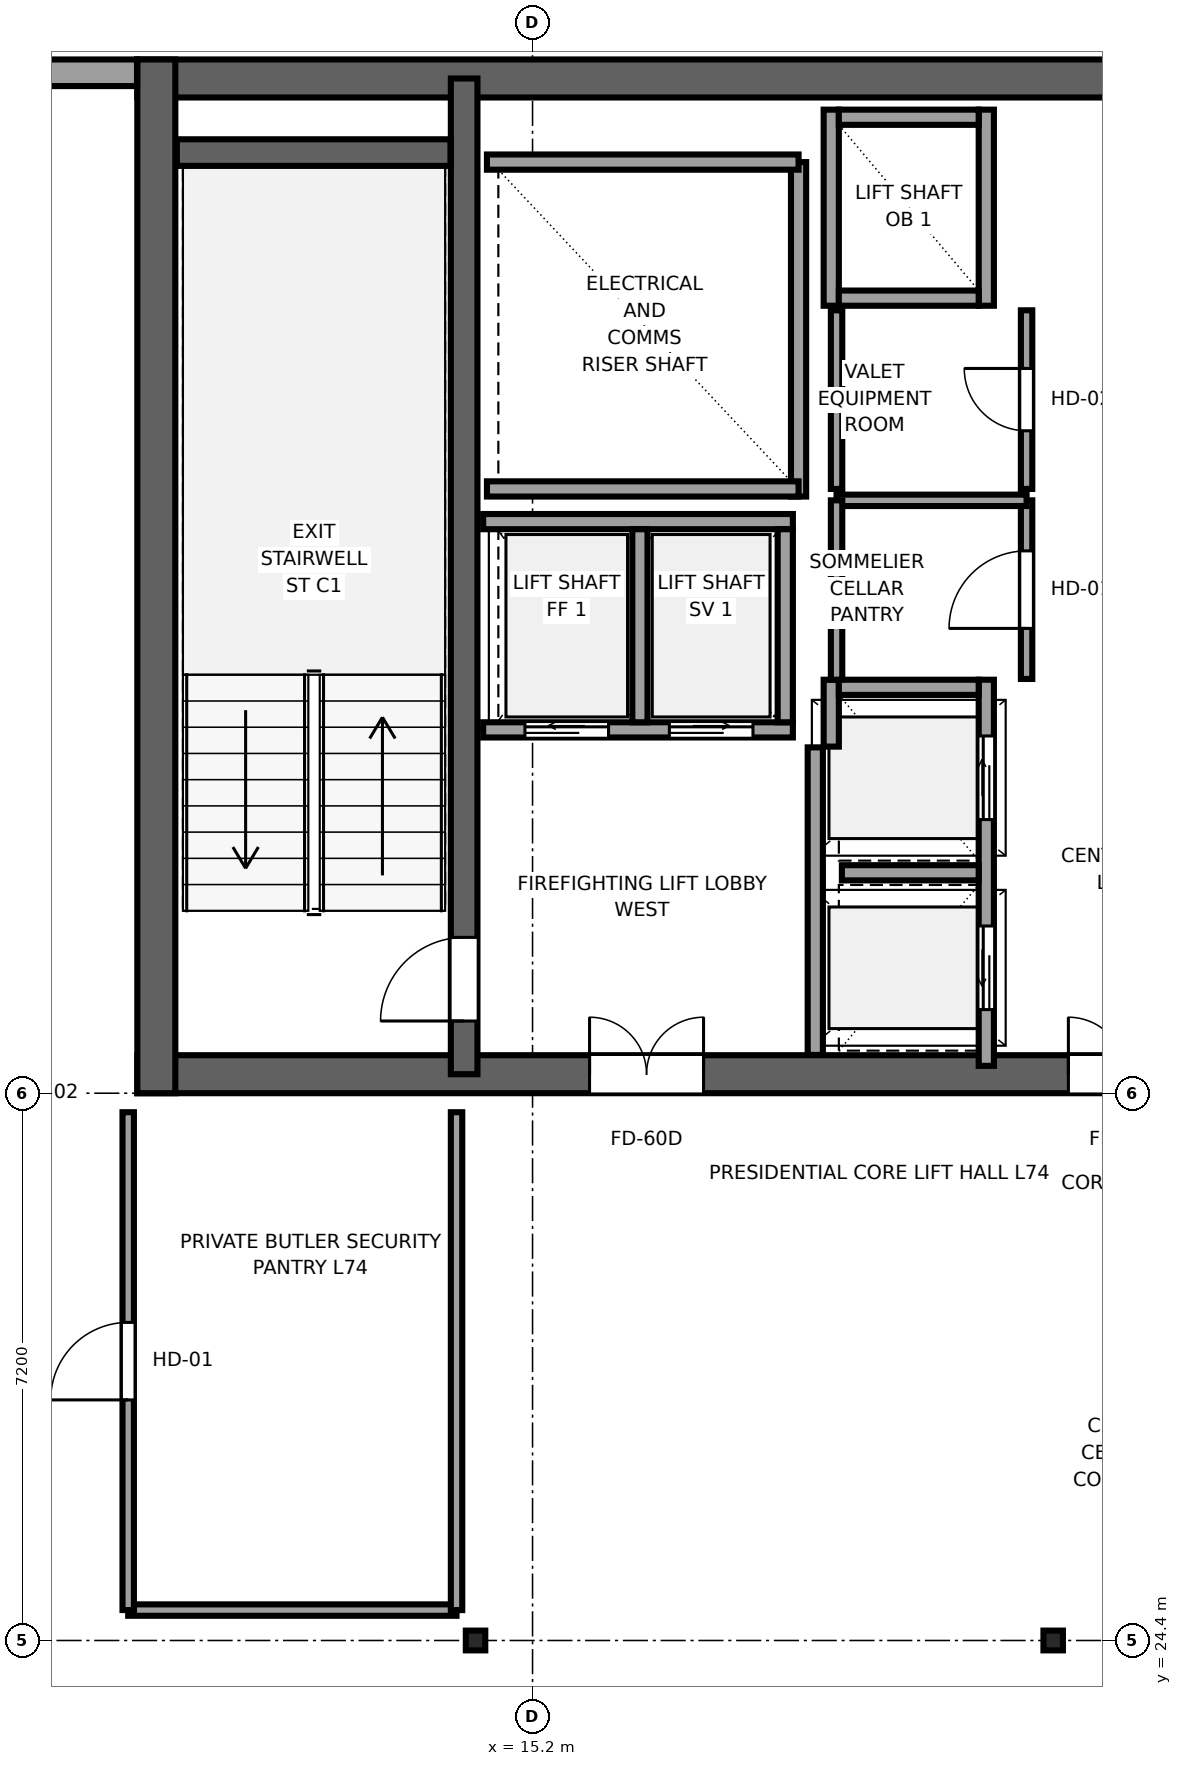
"""IFC4 building model, lengths in metres.
Left out: names, types, materials, properties, quantities, classifications, styles, units other than length and angle.
Written with IfcOpenShell. Run it as: python <this file> out.ifc"""

import sys

from ifc_helpers import new_model, si_unit, direction, frame, frame_2d, origin, origin_2d, place, context, subcontext, project, spatial, rectangle, i_section, extrude, source, transform, mapped, element, fill, save


model = new_model("IFC4")
c1 = context("Model", 3, precision=1e-05, world=origin(), true_north=direction((0.0, 1.0)))
c2 = subcontext(c1, "Body", "Model", "MODEL_VIEW")
j1 = project(units=[si_unit("LENGTHUNIT", "METRE"), si_unit("PLANEANGLEUNIT", "RADIAN")], contexts=[c1])
p1 = place(None, origin())
s1 = spatial("IfcSite", under=j1, at=p1, CompositionType="ELEMENT")
p2 = place(p1, origin())
s2 = spatial("IfcBuilding", under=s1, at=p2, CompositionType="ELEMENT")
p3 = place(p2, frame((0.0, 0.0, 278.6)))
s3 = spatial("IfcBuildingStorey", under=s2, at=p3, CompositionType="ELEMENT", Elevation=278.6)
p4 = place(p3, frame((10.0, 31.85, 0.0), z_axis=(0.0, 0.0, 1.0), x_axis=(1.0, 0.0, 0.0)))
e1 = element("IfcWall", 1, at=p4, inside=s3, PredefinedType="SHEAR", context=c2, shape_type="SweptSolid", body=[
    extrude(rectangle(XDim=26.0, YDim=0.5, at=frame_2d((13.0, 0.0))), origin(), (0.0, 0.0, 1.0), 3.55),
])
p5 = place(p4, frame((7.45, 0.0, 0.0), z_axis=(0.0, 0.0, 1.0), x_axis=(-1.0, 0.0, 0.0)))
e2 = element("IfcOpeningElement", 2, at=p5, cuts=e1, PredefinedType="OPENING", context=c2, shape_type="SweptSolid", body=[
    extrude(rectangle(XDim=1.5, YDim=2.04, at=frame_2d((0.75, 1.02))), frame((0.0, 0.26, 0.0), z_axis=(0.0, -1.0, 0.0), x_axis=(1.0, 0.0, 0.0)), (0.0, 0.0, 1.0), 0.52),
])
p6 = place(p4, frame((13.75, 0.0, 0.0), z_axis=(0.0, 0.0, 1.0), x_axis=(-1.0, 0.0, 0.0)))
e3 = element("IfcOpeningElement", 3, at=p6, cuts=e1, PredefinedType="OPENING", context=c2, shape_type="SweptSolid", body=[
    extrude(rectangle(XDim=1.5, YDim=2.04, at=frame_2d((0.75, 1.02))), frame((0.0, 0.26, 0.0), z_axis=(0.0, -1.0, 0.0), x_axis=(1.0, 0.0, 0.0)), (0.0, 0.0, 1.0), 0.52),
])
p7 = place(p4, frame((20.05, 0.0, 0.0), z_axis=(0.0, 0.0, 1.0), x_axis=(-1.0, 0.0, 0.0)))
e4 = element("IfcOpeningElement", 4, at=p7, cuts=e1, PredefinedType="OPENING", context=c2, shape_type="SweptSolid", body=[
    extrude(rectangle(XDim=1.5, YDim=2.04, at=frame_2d((0.75, 1.02))), frame((0.0, 0.26, 0.0), z_axis=(0.0, -1.0, 0.0), x_axis=(1.0, 0.0, 0.0)), (0.0, 0.0, 1.0), 0.52),
])
p8 = place(p3, frame((10.0, 44.95, 0.0), z_axis=(0.0, 0.0, 1.0), x_axis=(1.0, 0.0, 0.0)))
e5 = element("IfcWall", 5, at=p8, inside=s3, PredefinedType="SHEAR", context=c2, shape_type="SweptSolid", body=[
    extrude(rectangle(XDim=26.0, YDim=0.5, at=frame_2d((13.0, 0.0))), origin(), (0.0, 0.0, 1.0), 3.55),
])
p9 = place(p3, frame((10.25, 31.6, 0.0), z_axis=(0.0, 0.0, 1.0), x_axis=(0.0, 1.0, 0.0)))
e6 = element("IfcWall", 6, at=p9, inside=s3, PredefinedType="SHEAR", context=c2, shape_type="SweptSolid", body=[
    extrude(rectangle(XDim=13.6, YDim=0.5, at=frame_2d((6.8, 0.0))), origin(), (0.0, 0.0, 1.0), 3.55),
])
p10 = place(p3, frame((14.3, 31.85, 0.0), z_axis=(0.0, 0.0, 1.0), x_axis=(0.0, 1.0, 0.0)))
e7 = element("IfcWall", 7, at=p10, inside=s3, PredefinedType="SHEAR", context=c2, shape_type="SweptSolid", body=[
    extrude(rectangle(XDim=13.1, YDim=0.35, at=frame_2d((6.55, 0.0))), origin(), (0.0, 0.0, 1.0), 3.55),
])
p11 = place(p10, frame((0.7, 0.0, 0.0)))
e8 = element("IfcOpeningElement", 8, at=p11, cuts=e7, PredefinedType="OPENING", context=c2, shape_type="SweptSolid", body=[
    extrude(rectangle(XDim=1.1, YDim=2.12, at=frame_2d((0.55, 1.06))), frame((0.0, 0.185, 0.0), z_axis=(0.0, -1.0, 0.0), x_axis=(1.0, 0.0, 0.0)), (0.0, 0.0, 1.0), 0.37),
])
p12 = place(p3, frame((10.52, 43.975, 0.0), z_axis=(0.0, 0.0, 1.0), x_axis=(1.0, 0.0, 0.0)))
e9 = element("IfcWall", 9, at=p12, inside=s3, PredefinedType="SHEAR", context=c2, shape_type="SweptSolid", body=[
    extrude(rectangle(XDim=3.6, YDim=0.35, at=frame_2d((1.8, 0.0))), origin(), (0.0, 0.0, 1.0), 3.55),
])
m1 = source(origin(), c2, "Body", "SweptSolid", [
    extrude(i_section(OverallWidth=0.256, OverallDepth=0.26, WebThickness=0.01, FlangeThickness=0.017, FilletRadius=0.014, at=origin_2d()), origin(), (0.0, 0.0, 1.0), 3.55),
])
for number, where, z_axis, x_axis in (
    (10, (14.45, 24.4, 0.0), (0.0, 0.0, 1.0), (1.0, 0.0, 0.0)),
    (11, (22.05, 24.4, 0.0), (0.0, 0.0, 1.0), (1.0, 0.0, 0.0)),
):
    element("IfcColumn", number, at=place(p3, frame(where, z_axis=z_axis, x_axis=x_axis)), inside=s3, PredefinedType="COLUMN", context=c2, shape_type="MappedRepresentation", body=[
        mapped(m1, transform((0.0, 0.0, 0.0), x_axis=(1.0, 0.0, 0.0), y_axis=(0.0, 1.0, 0.0), z_axis=(0.0, 0.0, 1.0), scale=1.0)),
    ])
p13 = place(p3, frame((9.996, 45.025, 0.0), z_axis=(0.0, 0.0, 1.0), x_axis=(-1.0, 0.0, 0.0)))
e12 = element("IfcWall", 12, at=p13, inside=s3, PredefinedType="SOLIDWALL", context=c2, shape_type="SweptSolid", body=[
    extrude(rectangle(XDim=2.979, YDim=0.35, at=frame_2d((1.49, 0.0))), origin(), (0.0, 0.0, 1.0), 2.12),
])
p14 = place(p3, frame((18.7, 39.45, 0.0), z_axis=(0.0, 0.0, 1.0), x_axis=(0.0, 1.0, 0.0)))
e13 = element("IfcWall", 13, at=p14, inside=s3, PredefinedType="SOLIDWALL", context=c2, shape_type="SweptSolid", body=[
    extrude(rectangle(XDim=4.4, YDim=0.2, at=frame_2d((2.2, 0.0))), origin(), (0.0, 0.0, 1.0), 3.33),
])
for number, where, z_axis, x_axis in (
    (14, (14.6, 39.55, 0.0), (0.0, 0.0, 1.0), (1.0, 0.0, 0.0)),
    (15, (14.6, 43.85, 0.0), (0.0, 0.0, 1.0), (1.0, 0.0, 0.0)),
):
    element("IfcWall", number, at=place(p3, frame(where, z_axis=z_axis, x_axis=x_axis)), inside=s3, PredefinedType="SOLIDWALL", context=c2, shape_type="SweptSolid", body=[
        extrude(rectangle(XDim=4.1, YDim=0.2, at=frame_2d((2.05, 0.0))), origin(), (0.0, 0.0, 1.0), 3.33),
    ])
p15 = place(p3, frame((18.92, 32.104, 0.0), z_axis=(0.0, 0.0, 1.0), x_axis=(0.0, 1.0, 0.0)))
e16 = element("IfcWall", 16, at=p15, inside=s3, PredefinedType="SOLIDWALL", context=c2, shape_type="SweptSolid", body=[
    extrude(rectangle(XDim=4.046, YDim=0.2, at=frame_2d((2.023, 0.0))), origin(), (0.0, 0.0, 1.0), 3.33),
])
p16 = place(p3, frame((21.17, 31.96, 0.0), z_axis=(0.0, 0.0, 1.0), x_axis=(0.0, 1.0, 0.0)))
e17 = element("IfcWall", 17, at=p16, inside=s3, PredefinedType="SOLIDWALL", context=c2, shape_type="SweptSolid", body=[
    extrude(rectangle(XDim=5.08, YDim=0.2, at=frame_2d((2.54, 0.0))), origin(), (0.0, 0.0, 1.0), 3.33),
])
p17 = place(p16, frame((0.74, 0.0, 0.0)))
e18 = element("IfcOpeningElement", 18, at=p17, cuts=e17, PredefinedType="OPENING", context=c2, shape_type="SweptSolid", body=[
    extrude(rectangle(XDim=1.1, YDim=2.12, at=frame_2d((0.55, 1.06))), frame((0.0, 0.11, 0.0), z_axis=(0.0, -1.0, 0.0), x_axis=(1.0, 0.0, 0.0)), (0.0, 0.0, 1.0), 0.22),
])
p18 = place(p16, frame((3.24, 0.0, 0.0)))
e19 = element("IfcOpeningElement", 19, at=p18, cuts=e17, PredefinedType="OPENING", context=c2, shape_type="SweptSolid", body=[
    extrude(rectangle(XDim=1.1, YDim=2.12, at=frame_2d((0.55, 1.06))), frame((0.0, 0.11, 0.0), z_axis=(0.0, -1.0, 0.0), x_axis=(1.0, 0.0, 0.0)), (0.0, 0.0, 1.0), 0.22),
])
p19 = place(p3, frame((19.13, 36.16, 0.0), z_axis=(0.0, 0.0, 1.0), x_axis=(0.0, 1.0, 0.0)))
e20 = element("IfcWall", 20, at=p19, inside=s3, PredefinedType="SOLIDWALL", context=c2, shape_type="SweptSolid", body=[
    extrude(rectangle(XDim=0.88, YDim=0.2, at=frame_2d((0.44, 0.0))), origin(), (0.0, 0.0, 1.0), 3.33),
])
p20 = place(p3, frame((19.23, 36.94, 0.0), z_axis=(0.0, 0.0, 1.0), x_axis=(1.0, 0.0, 0.0)))
e21 = element("IfcWall", 21, at=p20, inside=s3, PredefinedType="SOLIDWALL", context=c2, shape_type="SweptSolid", body=[
    extrude(rectangle(XDim=1.84, YDim=0.2, at=frame_2d((0.92, 0.0))), origin(), (0.0, 0.0, 1.0), 3.33),
])
p21 = place(p3, frame((19.27, 34.5, 0.0), z_axis=(0.0, 0.0, 1.0), x_axis=(1.0, 0.0, 0.0)))
e22 = element("IfcWall", 22, at=p21, inside=s3, PredefinedType="SOLIDWALL", context=c2, shape_type="SweptSolid", body=[
    extrude(rectangle(XDim=1.8, YDim=0.2, at=frame_2d((0.9, 0.0))), origin(), (0.0, 0.0, 1.0), 3.33),
])
for number, where, z_axis, x_axis in (
    (23, (21.17, 41.96, 0.0), (0.0, 0.0, 1.0), (0.0, 1.0, 0.0)),
    (24, (19.13, 41.96, 0.0), (0.0, 0.0, 1.0), (0.0, 1.0, 0.0)),
):
    element("IfcWall", number, at=place(p3, frame(where, z_axis=z_axis, x_axis=x_axis)), inside=s3, PredefinedType="SOLIDWALL", context=c2, shape_type="SweptSolid", body=[
        extrude(rectangle(XDim=2.58, YDim=0.2, at=frame_2d((1.29, 0.0))), origin(), (0.0, 0.0, 1.0), 3.33),
    ])
for number, where, z_axis, x_axis in (
    (25, (19.23, 42.06, 0.0), (0.0, 0.0, 1.0), (1.0, 0.0, 0.0)),
    (26, (19.23, 44.44, 0.0), (0.0, 0.0, 1.0), (1.0, 0.0, 0.0)),
):
    element("IfcWall", number, at=place(p3, frame(where, z_axis=z_axis, x_axis=x_axis)), inside=s3, PredefinedType="SOLIDWALL", context=c2, shape_type="SweptSolid", body=[
        extrude(rectangle(XDim=1.84, YDim=0.2, at=frame_2d((0.92, 0.0))), origin(), (0.0, 0.0, 1.0), 3.33),
    ])
p22 = place(p3, frame((14.55, 36.38, 0.0), z_axis=(0.0, 0.0, 1.0), x_axis=(1.0, 0.0, 0.0)))
e27 = element("IfcWall", 27, at=p22, inside=s3, PredefinedType="SOLIDWALL", context=c2, shape_type="SweptSolid", body=[
    extrude(rectangle(XDim=4.075, YDim=0.2, at=frame_2d((2.038, 0.0))), origin(), (0.0, 0.0, 1.0), 3.33),
])
p23 = place(p22, frame((0.55, 0.0, 0.0)))
e28 = element("IfcOpeningElement", 28, at=p23, cuts=e27, PredefinedType="OPENING", context=c2, shape_type="SweptSolid", body=[
    extrude(rectangle(XDim=1.1, YDim=2.12, at=frame_2d((0.55, 1.06))), frame((0.0, 0.11, 0.0), z_axis=(0.0, -1.0, 0.0), x_axis=(1.0, 0.0, 0.0)), (0.0, 0.0, 1.0), 0.22),
])
p24 = place(p22, frame((2.45, 0.0, 0.0)))
e29 = element("IfcOpeningElement", 29, at=p24, cuts=e27, PredefinedType="OPENING", context=c2, shape_type="SweptSolid", body=[
    extrude(rectangle(XDim=1.1, YDim=2.12, at=frame_2d((0.55, 1.06))), frame((0.0, 0.11, 0.0), z_axis=(0.0, -1.0, 0.0), x_axis=(1.0, 0.0, 0.0)), (0.0, 0.0, 1.0), 0.22),
])
p25 = place(p3, frame((14.55, 39.12, 0.0), z_axis=(0.0, 0.0, 1.0), x_axis=(1.0, 0.0, 0.0)))
e30 = element("IfcWall", 30, at=p25, inside=s3, PredefinedType="SOLIDWALL", context=c2, shape_type="SweptSolid", body=[
    extrude(rectangle(XDim=4.075, YDim=0.2, at=frame_2d((2.038, 0.0))), origin(), (0.0, 0.0, 1.0), 3.33),
])
for number, where, z_axis, x_axis in (
    (31, (18.525, 36.48, 0.0), (0.0, 0.0, 1.0), (0.0, 1.0, 0.0)),
    (32, (16.613, 36.48, 0.0), (0.0, 0.0, 1.0), (0.0, 1.0, 0.0)),
):
    element("IfcWall", number, at=place(p3, frame(where, z_axis=z_axis, x_axis=x_axis)), inside=s3, PredefinedType="SOLIDWALL", context=c2, shape_type="SweptSolid", body=[
        extrude(rectangle(XDim=2.54, YDim=0.2, at=frame_2d((1.27, 0.0))), origin(), (0.0, 0.0, 1.0), 3.33),
    ])
p26 = place(p3, frame((21.7, 37.05, 0.0), z_axis=(0.0, 0.0, 1.0), x_axis=(0.0, 1.0, 0.0)))
e33 = element("IfcWall", 33, at=p26, inside=s3, PredefinedType="PARTITIONING", context=c2, shape_type="SweptSolid", body=[
    extrude(rectangle(XDim=2.35, YDim=0.15, at=frame_2d((1.175, 0.0))), origin(), (0.0, 0.0, 1.0), 3.33),
])
p27 = place(p26, frame((0.665, 0.0, 0.0)))
e34 = element("IfcOpeningElement", 34, at=p27, cuts=e33, PredefinedType="OPENING", context=c2, shape_type="SweptSolid", body=[
    extrude(rectangle(XDim=1.02, YDim=2.03, at=frame_2d((0.51, 1.015))), frame((0.0, 0.085, 0.0), z_axis=(0.0, -1.0, 0.0), x_axis=(1.0, 0.0, 0.0)), (0.0, 0.0, 1.0), 0.17),
])
p28 = place(p3, frame((19.2, 39.4, 0.0), z_axis=(0.0, 0.0, 1.0), x_axis=(1.0, 0.0, 0.0)))
e35 = element("IfcWall", 35, at=p28, inside=s3, PredefinedType="PARTITIONING", context=c2, shape_type="SweptSolid", body=[
    extrude(rectangle(XDim=2.5, YDim=0.15, at=frame_2d((1.25, 0.0))), origin(), (0.0, 0.0, 1.0), 3.33),
])
p29 = place(p3, frame((19.2, 37.04, 0.0), z_axis=(0.0, 0.0, 1.0), x_axis=(0.0, 1.0, 0.0)))
e36 = element("IfcWall", 36, at=p29, inside=s3, PredefinedType="PARTITIONING", context=c2, shape_type="SweptSolid", body=[
    extrude(rectangle(XDim=2.36, YDim=0.15, at=frame_2d((1.18, 0.0))), origin(), (0.0, 0.0, 1.0), 3.33),
])
p30 = place(p3, frame((21.7, 39.55, 0.0), z_axis=(0.0, 0.0, 1.0), x_axis=(0.0, 1.0, 0.0)))
e37 = element("IfcWall", 37, at=p30, inside=s3, PredefinedType="PARTITIONING", context=c2, shape_type="SweptSolid", body=[
    extrude(rectangle(XDim=2.35, YDim=0.15, at=frame_2d((1.175, 0.0))), origin(), (0.0, 0.0, 1.0), 3.33),
])
p31 = place(p30, frame((0.765, 0.0, 0.0)))
e38 = element("IfcOpeningElement", 38, at=p31, cuts=e37, PredefinedType="OPENING", context=c2, shape_type="SweptSolid", body=[
    extrude(rectangle(XDim=0.82, YDim=2.01, at=frame_2d((0.41, 1.005))), frame((0.0, 0.085, 0.0), z_axis=(0.0, -1.0, 0.0), x_axis=(1.0, 0.0, 0.0)), (0.0, 0.0, 1.0), 0.17),
])
p32 = place(p3, frame((19.2, 39.55, 0.0), z_axis=(0.0, 0.0, 1.0), x_axis=(0.0, 1.0, 0.0)))
e39 = element("IfcWall", 39, at=p32, inside=s3, PredefinedType="PARTITIONING", context=c2, shape_type="SweptSolid", body=[
    extrude(rectangle(XDim=2.35, YDim=0.15, at=frame_2d((1.175, 0.0))), origin(), (0.0, 0.0, 1.0), 3.33),
])
p33 = place(p3, frame((9.88, 24.8, 0.0), z_axis=(0.0, 0.0, 1.0), x_axis=(1.0, 0.0, 0.0)))
e40 = element("IfcWall", 40, at=p33, inside=s3, PredefinedType="PARTITIONING", context=c2, shape_type="SweptSolid", body=[
    extrude(rectangle(XDim=4.32, YDim=0.15, at=frame_2d((2.16, 0.0))), origin(), (0.0, 0.0, 1.0), 3.33),
])
p34 = place(p3, frame((9.88, 24.8, 0.0), z_axis=(0.0, 0.0, 1.0), x_axis=(0.0, 1.0, 0.0)))
e41 = element("IfcWall", 41, at=p34, inside=s3, PredefinedType="PARTITIONING", context=c2, shape_type="SweptSolid", body=[
    extrude(rectangle(XDim=6.55, YDim=0.15, at=frame_2d((3.275, 0.0))), origin(), (0.0, 0.0, 1.0), 3.33),
])
p35 = place(p34, frame((2.765, 0.0, 0.0)))
e42 = element("IfcOpeningElement", 42, at=p35, cuts=e41, PredefinedType="OPENING", context=c2, shape_type="SweptSolid", body=[
    extrude(rectangle(XDim=1.02, YDim=2.03, at=frame_2d((0.51, 1.015))), frame((0.0, 0.085, 0.0), z_axis=(0.0, -1.0, 0.0), x_axis=(1.0, 0.0, 0.0)), (0.0, 0.0, 1.0), 0.17),
])
p36 = place(p3, frame((14.2, 24.8, 0.0), z_axis=(0.0, 0.0, 1.0), x_axis=(0.0, 1.0, 0.0)))
e43 = element("IfcWall", 43, at=p36, inside=s3, PredefinedType="PARTITIONING", context=c2, shape_type="SweptSolid", body=[
    extrude(rectangle(XDim=6.55, YDim=0.15, at=frame_2d((3.275, 0.0))), origin(), (0.0, 0.0, 1.0), 3.33),
])
m2 = source(origin(), c2, "Body", "SweptSolid", [
    extrude(rectangle(XDim=1.1, YDim=2.12, at=frame_2d((0.55, 1.06))), frame((0.0, 0.025, 0.0), z_axis=(0.0, -1.0, 0.0), x_axis=(1.0, 0.0, 0.0)), (0.0, 0.0, 1.0), 0.05),
])
p37 = place(p11, origin())
e44 = element("IfcDoor", 44, at=p37, inside=s3, OperationType="SINGLE_SWING_LEFT", PredefinedType="DOOR", context=c2, shape_type="MappedRepresentation", body=[
    mapped(m2, transform((0.0, 0.0, 0.0), x_axis=(1.0, 0.0, 0.0), y_axis=(0.0, 1.0, 0.0), z_axis=(0.0, 0.0, 1.0), scale=1.0)),
])
fill(e8, e44)
m3 = source(origin(), c2, "Body", "SweptSolid", [
    extrude(rectangle(XDim=1.5, YDim=2.04, at=frame_2d((0.75, 1.02))), frame((0.0, 0.025, 0.0), z_axis=(0.0, -1.0, 0.0), x_axis=(1.0, 0.0, 0.0)), (0.0, 0.0, 1.0), 0.05),
])
p38 = place(p5, origin())
e45 = element("IfcDoor", 45, at=p38, inside=s3, OperationType="DOUBLE_DOOR_SINGLE_SWING", PredefinedType="DOOR", context=c2, shape_type="MappedRepresentation", body=[
    mapped(m3, transform((0.0, 0.0, 0.0), x_axis=(1.0, 0.0, 0.0), y_axis=(0.0, 1.0, 0.0), z_axis=(0.0, 0.0, 1.0), scale=1.0)),
])
fill(e2, e45)
p39 = place(p6, origin())
e46 = element("IfcDoor", 46, at=p39, inside=s3, OperationType="DOUBLE_DOOR_SINGLE_SWING", PredefinedType="DOOR", context=c2, shape_type="MappedRepresentation", body=[
    mapped(m3, transform((0.0, 0.0, 0.0), x_axis=(1.0, 0.0, 0.0), y_axis=(0.0, 1.0, 0.0), z_axis=(0.0, 0.0, 1.0), scale=1.0)),
])
fill(e3, e46)
m4 = source(origin(), c2, "Body", "SweptSolid", [
    extrude(rectangle(XDim=1.1, YDim=2.12, at=frame_2d((0.55, 1.06))), frame((0.0, 0.025, 0.0), z_axis=(0.0, -1.0, 0.0), x_axis=(1.0, 0.0, 0.0)), (0.0, 0.0, 1.0), 0.05),
])
p40 = place(p17, origin())
e47 = element("IfcDoor", 47, at=p40, inside=s3, OperationType="SLIDING_TO_LEFT", PredefinedType="DOOR", context=c2, shape_type="MappedRepresentation", body=[
    mapped(m4, transform((0.0, 0.0, 0.0), x_axis=(1.0, 0.0, 0.0), y_axis=(0.0, 1.0, 0.0), z_axis=(0.0, 0.0, 1.0), scale=1.0)),
])
fill(e18, e47)
p41 = place(p18, origin())
e48 = element("IfcDoor", 48, at=p41, inside=s3, OperationType="SLIDING_TO_RIGHT", PredefinedType="DOOR", context=c2, shape_type="MappedRepresentation", body=[
    mapped(m4, transform((0.0, 0.0, 0.0), x_axis=(1.0, 0.0, 0.0), y_axis=(0.0, 1.0, 0.0), z_axis=(0.0, 0.0, 1.0), scale=1.0)),
])
fill(e19, e48)
p42 = place(p23, origin())
e49 = element("IfcDoor", 49, at=p42, inside=s3, OperationType="SLIDING_TO_LEFT", PredefinedType="DOOR", context=c2, shape_type="MappedRepresentation", body=[
    mapped(m4, transform((0.0, 0.0, 0.0), x_axis=(1.0, 0.0, 0.0), y_axis=(0.0, 1.0, 0.0), z_axis=(0.0, 0.0, 1.0), scale=1.0)),
])
fill(e28, e49)
p43 = place(p24, origin())
e50 = element("IfcDoor", 50, at=p43, inside=s3, OperationType="SLIDING_TO_RIGHT", PredefinedType="DOOR", context=c2, shape_type="MappedRepresentation", body=[
    mapped(m4, transform((0.0, 0.0, 0.0), x_axis=(1.0, 0.0, 0.0), y_axis=(0.0, 1.0, 0.0), z_axis=(0.0, 0.0, 1.0), scale=1.0)),
])
fill(e29, e50)
m5 = source(origin(), c2, "Body", "SweptSolid", [
    extrude(rectangle(XDim=1.02, YDim=2.03, at=frame_2d((0.51, 1.015))), frame((0.0, 0.025, 0.0), z_axis=(0.0, -1.0, 0.0), x_axis=(1.0, 0.0, 0.0)), (0.0, 0.0, 1.0), 0.05),
])
p44 = place(p27, origin())
e51 = element("IfcDoor", 51, at=p44, inside=s3, OperationType="SINGLE_SWING_LEFT", PredefinedType="DOOR", context=c2, shape_type="MappedRepresentation", body=[
    mapped(m5, transform((0.0, 0.0, 0.0), x_axis=(1.0, 0.0, 0.0), y_axis=(0.0, 1.0, 0.0), z_axis=(0.0, 0.0, 1.0), scale=1.0)),
])
fill(e34, e51)
m6 = source(origin(), c2, "Body", "SweptSolid", [
    extrude(rectangle(XDim=0.82, YDim=2.01, at=frame_2d((0.41, 1.005))), frame((0.0, 0.025, 0.0), z_axis=(0.0, -1.0, 0.0), x_axis=(1.0, 0.0, 0.0)), (0.0, 0.0, 1.0), 0.05),
])
p45 = place(p31, origin())
e52 = element("IfcDoor", 52, at=p45, inside=s3, OperationType="SINGLE_SWING_RIGHT", PredefinedType="DOOR", context=c2, shape_type="MappedRepresentation", body=[
    mapped(m6, transform((0.0, 0.0, 0.0), x_axis=(1.0, 0.0, 0.0), y_axis=(0.0, 1.0, 0.0), z_axis=(0.0, 0.0, 1.0), scale=1.0)),
])
fill(e38, e52)
p46 = place(p35, origin())
e53 = element("IfcDoor", 53, at=p46, inside=s3, OperationType="SINGLE_SWING_LEFT", PredefinedType="DOOR", context=c2, shape_type="MappedRepresentation", body=[
    mapped(m5, transform((0.0, 0.0, 0.0), x_axis=(1.0, 0.0, 0.0), y_axis=(0.0, 1.0, 0.0), z_axis=(0.0, 0.0, 1.0), scale=1.0)),
])
fill(e42, e53)
save(model, sys.argv[1])
